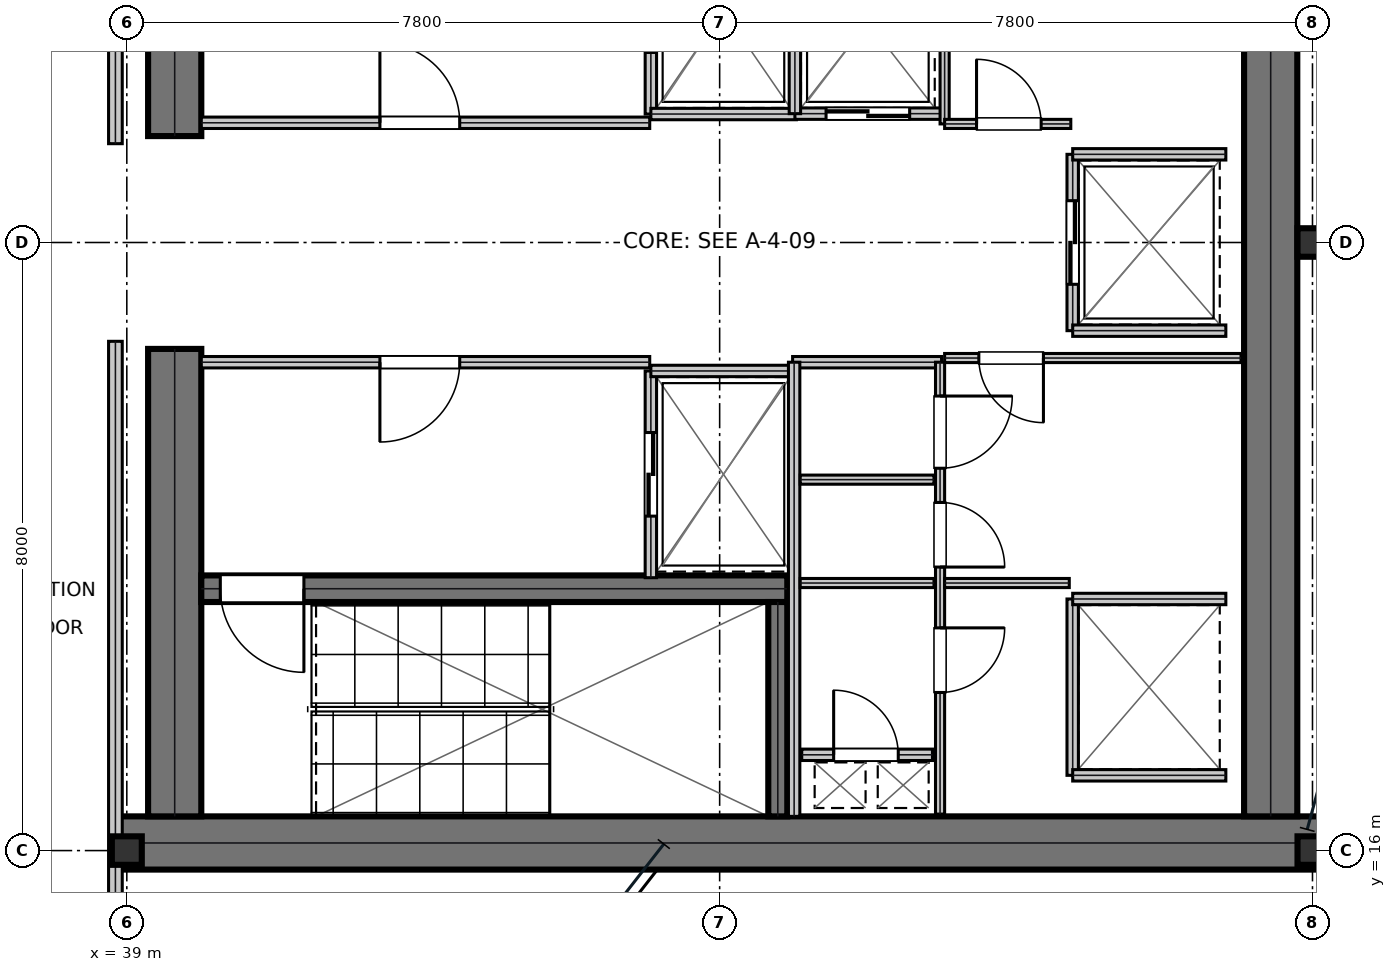
"""IFC4 building model, lengths in metres.
Left out: names, types, materials, properties, quantities, classifications, styles, units other than length and angle.
Written with IfcOpenShell. Run it as: python <this file> out.ifc"""

import sys

from ifc_helpers import new_model, si_unit, direction, frame, frame_2d, origin, origin_2d, place, context, subcontext, project, spatial, rectangle, i_section, extrude, element, fill, save


model = new_model("IFC4")
c1 = context("Model", 3, precision=1e-05, world=origin(), true_north=direction((0.0, 1.0)))
c2 = subcontext(c1, "Body", "Model", "MODEL_VIEW")
j1 = project(units=[si_unit("LENGTHUNIT", "METRE"), si_unit("PLANEANGLEUNIT", "RADIAN")], contexts=[c1])
p1 = place(None, origin())
s1 = spatial("IfcSite", under=j1, at=p1, CompositionType="ELEMENT")
p2 = place(p1, origin())
s2 = spatial("IfcBuilding", under=s1, at=p2, CompositionType="ELEMENT")
p3 = place(p2, frame((0.0, 0.0, 244.5)))
s3 = spatial("IfcBuildingStorey", under=s2, at=p3, CompositionType="ELEMENT", Elevation=244.5)
p4 = place(p3, frame((38.8, 16.1, 0.0), z_axis=(0.0, 0.0, 1.0), x_axis=(1.0, 0.0, 0.0)))
e1 = element("IfcWall", 1, at=p4, inside=s3, PredefinedType="SHEAR", context=c2, shape_type="SweptSolid", body=[
    extrude(rectangle(XDim=16.0, YDim=0.7, at=frame_2d((8.0, 0.0))), origin(), (0.0, 0.0, 1.0), 3.79),
])
for number, where, z_axis, x_axis in (
    (2, (39.63, 16.45, 0.0), (0.0, 0.0, 1.0), (0.0, 1.0, 0.0)),
    (3, (39.63, 25.4, 0.0), (0.0, 0.0, 1.0), (0.0, 1.0, 0.0)),
):
    element("IfcWall", number, at=place(p3, frame(where, z_axis=z_axis, x_axis=x_axis)), inside=s3, PredefinedType="SHEAR", context=c2, shape_type="SweptSolid", body=[
        extrude(rectangle(XDim=6.15, YDim=0.7, at=frame_2d((3.075, 0.0))), origin(), (0.0, 0.0, 1.0), 3.79),
    ])
p5 = place(p3, frame((54.05, 16.45, 0.0), z_axis=(0.0, 0.0, 1.0), x_axis=(0.0, 1.0, 0.0)))
e4 = element("IfcWall", 4, at=p5, inside=s3, PredefinedType="SHEAR", context=c2, shape_type="SweptSolid", body=[
    extrude(rectangle(XDim=15.1, YDim=0.7, at=frame_2d((7.55, 0.0))), origin(), (0.0, 0.0, 1.0), 3.79),
])
p6 = place(p3, frame((39.98, 19.445, 0.0), z_axis=(0.0, 0.0, 1.0), x_axis=(1.0, 0.0, 0.0)))
e5 = element("IfcWall", 5, at=p6, inside=s3, PredefinedType="SHEAR", context=c2, shape_type="SweptSolid", body=[
    extrude(rectangle(XDim=7.71, YDim=0.35, at=frame_2d((3.855, 0.0))), origin(), (0.0, 0.0, 1.0), 3.79),
])
p7 = place(p6, frame((0.25, 0.0, 0.0)))
e6 = element("IfcOpeningElement", 6, at=p7, cuts=e5, PredefinedType="OPENING", context=c2, shape_type="SweptSolid", body=[
    extrude(rectangle(XDim=1.1, YDim=2.15, at=frame_2d((0.55, 1.075))), frame((0.0, 0.185, 0.0), z_axis=(0.0, -1.0, 0.0), x_axis=(1.0, 0.0, 0.0)), (0.0, 0.0, 1.0), 0.37),
])
p8 = place(p3, frame((47.565, 16.45, 0.0), z_axis=(0.0, 0.0, 1.0), x_axis=(0.0, 1.0, 0.0)))
e7 = element("IfcWall", 7, at=p8, inside=s3, PredefinedType="SHEAR", context=c2, shape_type="SweptSolid", body=[
    extrude(rectangle(XDim=2.82, YDim=0.25, at=frame_2d((1.41, 0.0))), origin(), (0.0, 0.0, 1.0), 3.79),
])
for number, where, z_axis, x_axis in (
    (8, (39.0, 16.0, 0.0), (0.0, 0.0, 1.0), (1.0, 0.0, 0.0)),
    (9, (54.6, 16.0, 0.0), (0.0, 0.0, 1.0), (1.0, 0.0, 0.0)),
    (10, (54.6, 24.0, 0.0), (0.0, 0.0, 1.0), (1.0, 0.0, 0.0)),
):
    element("IfcColumn", number, at=place(p3, frame(where, z_axis=z_axis, x_axis=x_axis)), inside=s3, PredefinedType="COLUMN", context=c2, shape_type="SweptSolid", body=[
        extrude(i_section(OverallWidth=0.394, OverallDepth=0.375, WebThickness=0.017, FlangeThickness=0.028, at=origin_2d()), origin(), (0.0, 0.0, 1.0), 4.044),
    ])
p9 = place(p3, frame((39.98, 25.575, 0.0), z_axis=(0.0, 0.0, 1.0), x_axis=(1.0, 0.0, 0.0)))
e11 = element("IfcWall", 11, at=p9, inside=s3, PredefinedType="PARTITIONING", context=c2, shape_type="SweptSolid", body=[
    extrude(rectangle(XDim=5.9, YDim=0.15, at=frame_2d((2.95, 0.0))), origin(), (0.0, 0.0, 1.0), 3.79),
])
p10 = place(p9, frame((2.35, 0.0, 0.0)))
e12 = element("IfcOpeningElement", 12, at=p10, cuts=e11, PredefinedType="OPENING", context=c2, shape_type="SweptSolid", body=[
    extrude(rectangle(XDim=1.05, YDim=2.15, at=frame_2d((0.525, 1.075))), frame((0.0, 0.085, 0.0), z_axis=(0.0, -1.0, 0.0), x_axis=(1.0, 0.0, 0.0)), (0.0, 0.0, 1.0), 0.17),
])
p11 = place(p3, frame((39.98, 22.425, 0.0), z_axis=(0.0, 0.0, 1.0), x_axis=(1.0, 0.0, 0.0)))
e13 = element("IfcWall", 13, at=p11, inside=s3, PredefinedType="PARTITIONING", context=c2, shape_type="SweptSolid", body=[
    extrude(rectangle(XDim=5.9, YDim=0.15, at=frame_2d((2.95, 0.0))), origin(), (0.0, 0.0, 1.0), 3.79),
])
p12 = place(p11, frame((2.35, 0.0, 0.0)))
e14 = element("IfcOpeningElement", 14, at=p12, cuts=e13, PredefinedType="OPENING", context=c2, shape_type="SweptSolid", body=[
    extrude(rectangle(XDim=1.05, YDim=2.15, at=frame_2d((0.525, 1.075))), frame((0.0, 0.085, 0.0), z_axis=(0.0, -1.0, 0.0), x_axis=(1.0, 0.0, 0.0)), (0.0, 0.0, 1.0), 0.17),
])
p13 = place(p3, frame((45.895, 25.69, 0.0), z_axis=(0.0, 0.0, 1.0), x_axis=(0.0, 1.0, 0.0)))
e15 = element("IfcWall", 15, at=p13, inside=s3, PredefinedType="PARTITIONING", context=c2, shape_type="SweptSolid", body=[
    extrude(rectangle(XDim=2.72, YDim=0.15, at=frame_2d((1.36, 0.0))), origin(), (0.0, 0.0, 1.0), 3.79),
])
p14 = place(p13, frame((0.81, 0.0, 0.0)))
e16 = element("IfcOpeningElement", 16, at=p14, cuts=e15, PredefinedType="OPENING", context=c2, shape_type="SweptSolid", body=[
    extrude(rectangle(XDim=1.1, YDim=2.15, at=frame_2d((0.55, 1.075))), frame((0.0, 0.085, 0.0), z_axis=(0.0, -1.0, 0.0), x_axis=(1.0, 0.0, 0.0)), (0.0, 0.0, 1.0), 0.17),
])
p15 = place(p3, frame((45.895, 25.69, 0.0), z_axis=(0.0, 0.0, 1.0), x_axis=(1.0, 0.0, 0.0)))
e17 = element("IfcWall", 17, at=p15, inside=s3, PredefinedType="PARTITIONING", context=c2, shape_type="SweptSolid", body=[
    extrude(rectangle(XDim=1.915, YDim=0.15, at=frame_2d((0.958, 0.0))), origin(), (0.0, 0.0, 1.0), 3.79),
])
p16 = place(p3, frame((45.895, 19.59, 0.0), z_axis=(0.0, 0.0, 1.0), x_axis=(0.0, 1.0, 0.0)))
e18 = element("IfcWall", 18, at=p16, inside=s3, PredefinedType="PARTITIONING", context=c2, shape_type="SweptSolid", body=[
    extrude(rectangle(XDim=2.72, YDim=0.15, at=frame_2d((1.36, 0.0))), origin(), (0.0, 0.0, 1.0), 3.79),
])
p17 = place(p16, frame((0.81, 0.0, 0.0)))
e19 = element("IfcOpeningElement", 19, at=p17, cuts=e18, PredefinedType="OPENING", context=c2, shape_type="SweptSolid", body=[
    extrude(rectangle(XDim=1.1, YDim=2.15, at=frame_2d((0.55, 1.075))), frame((0.0, 0.085, 0.0), z_axis=(0.0, -1.0, 0.0), x_axis=(1.0, 0.0, 0.0)), (0.0, 0.0, 1.0), 0.17),
])
p18 = place(p3, frame((45.895, 22.31, 0.0), z_axis=(0.0, 0.0, 1.0), x_axis=(1.0, 0.0, 0.0)))
e20 = element("IfcWall", 20, at=p18, inside=s3, PredefinedType="PARTITIONING", context=c2, shape_type="SweptSolid", body=[
    extrude(rectangle(XDim=1.915, YDim=0.15, at=frame_2d((0.958, 0.0))), origin(), (0.0, 0.0, 1.0), 3.79),
])
p19 = place(p3, frame((47.79, 25.695, 0.0), z_axis=(0.0, 0.0, 1.0), x_axis=(1.0, 0.0, 0.0)))
e21 = element("IfcWall", 21, at=p19, inside=s3, PredefinedType="PARTITIONING", context=c2, shape_type="SweptSolid", body=[
    extrude(rectangle(XDim=1.92, YDim=0.15, at=frame_2d((0.96, 0.0))), origin(), (0.0, 0.0, 1.0), 3.79),
])
p20 = place(p19, frame((0.41, 0.0, 0.0)))
e22 = element("IfcOpeningElement", 22, at=p20, cuts=e21, PredefinedType="OPENING", context=c2, shape_type="SweptSolid", body=[
    extrude(rectangle(XDim=1.1, YDim=2.15, at=frame_2d((0.55, 1.075))), frame((0.0, 0.085, 0.0), z_axis=(0.0, -1.0, 0.0), x_axis=(1.0, 0.0, 0.0)), (0.0, 0.0, 1.0), 0.17),
])
p21 = place(p3, frame((47.79, 25.695, 0.0), z_axis=(0.0, 0.0, 1.0), x_axis=(0.0, 1.0, 0.0)))
e23 = element("IfcWall", 23, at=p21, inside=s3, PredefinedType="PARTITIONING", context=c2, shape_type="SweptSolid", body=[
    extrude(rectangle(XDim=2.415, YDim=0.15, at=frame_2d((1.208, 0.0))), origin(), (0.0, 0.0, 1.0), 3.79),
])
p22 = place(p3, frame((51.445, 22.84, 0.0), z_axis=(0.0, 0.0, 1.0), x_axis=(0.0, 1.0, 0.0)))
e24 = element("IfcWall", 24, at=p22, inside=s3, PredefinedType="PARTITIONING", context=c2, shape_type="SweptSolid", body=[
    extrude(rectangle(XDim=2.32, YDim=0.15, at=frame_2d((1.16, 0.0))), origin(), (0.0, 0.0, 1.0), 3.79),
])
p23 = place(p22, frame((0.61, 0.0, 0.0)))
e25 = element("IfcOpeningElement", 25, at=p23, cuts=e24, PredefinedType="OPENING", context=c2, shape_type="SweptSolid", body=[
    extrude(rectangle(XDim=1.1, YDim=2.15, at=frame_2d((0.55, 1.075))), frame((0.0, 0.085, 0.0), z_axis=(0.0, -1.0, 0.0), x_axis=(1.0, 0.0, 0.0)), (0.0, 0.0, 1.0), 0.17),
])
for number, where, z_axis, x_axis in (
    (26, (51.445, 22.84, 0.0), (0.0, 0.0, 1.0), (1.0, 0.0, 0.0)),
    (27, (51.445, 25.16, 0.0), (0.0, 0.0, 1.0), (1.0, 0.0, 0.0)),
):
    element("IfcWall", number, at=place(p3, frame(where, z_axis=z_axis, x_axis=x_axis)), inside=s3, PredefinedType="PARTITIONING", context=c2, shape_type="SweptSolid", body=[
        extrude(rectangle(XDim=2.015, YDim=0.15, at=frame_2d((1.007, 0.0))), origin(), (0.0, 0.0, 1.0), 3.79),
    ])
p24 = place(p3, frame((51.445, 16.99, 0.0), z_axis=(0.0, 0.0, 1.0), x_axis=(0.0, 1.0, 0.0)))
e28 = element("IfcWall", 28, at=p24, inside=s3, PredefinedType="PARTITIONING", context=c2, shape_type="SweptSolid", body=[
    extrude(rectangle(XDim=2.32, YDim=0.15, at=frame_2d((1.16, 0.0))), origin(), (0.0, 0.0, 1.0), 3.79),
])
for number, where, z_axis, x_axis in (
    (29, (51.445, 16.99, 0.0), (0.0, 0.0, 1.0), (1.0, 0.0, 0.0)),
    (30, (51.445, 19.31, 0.0), (0.0, 0.0, 1.0), (1.0, 0.0, 0.0)),
):
    element("IfcWall", number, at=place(p3, frame(where, z_axis=z_axis, x_axis=x_axis)), inside=s3, PredefinedType="PARTITIONING", context=c2, shape_type="SweptSolid", body=[
        extrude(rectangle(XDim=2.015, YDim=0.15, at=frame_2d((1.007, 0.0))), origin(), (0.0, 0.0, 1.0), 3.79),
    ])
p25 = place(p3, frame((47.88, 17.26, 0.0), z_axis=(0.0, 0.0, 1.0), x_axis=(1.0, 0.0, 0.0)))
e31 = element("IfcWall", 31, at=p25, inside=s3, PredefinedType="PARTITIONING", context=c2, shape_type="SweptSolid", body=[
    extrude(rectangle(XDim=1.72, YDim=0.15, at=frame_2d((0.86, 0.0))), origin(), (0.0, 0.0, 1.0), 3.79),
])
p26 = place(p25, frame((0.42, 0.0, 0.0)))
e32 = element("IfcOpeningElement", 32, at=p26, cuts=e31, PredefinedType="OPENING", context=c2, shape_type="SweptSolid", body=[
    extrude(rectangle(XDim=0.85, YDim=2.15, at=frame_2d((0.425, 1.075))), frame((0.0, 0.085, 0.0), z_axis=(0.0, -1.0, 0.0), x_axis=(1.0, 0.0, 0.0)), (0.0, 0.0, 1.0), 0.17),
])
p27 = place(p3, frame((47.76, 22.425, 0.0), z_axis=(0.0, 0.0, 1.0), x_axis=(1.0, 0.0, 0.0)))
e33 = element("IfcWall", 33, at=p27, inside=s3, PredefinedType="PARTITIONING", context=c2, shape_type="SweptSolid", body=[
    extrude(rectangle(XDim=1.96, YDim=0.15, at=frame_2d((0.98, 0.0))), origin(), (0.0, 0.0, 1.0), 3.79),
])
p28 = place(p3, frame((47.78, 16.45, 0.0), z_axis=(0.0, 0.0, 1.0), x_axis=(0.0, 1.0, 0.0)))
e34 = element("IfcWall", 34, at=p28, inside=s3, PredefinedType="PARTITIONING", context=c2, shape_type="SweptSolid", body=[
    extrude(rectangle(XDim=5.975, YDim=0.15, at=frame_2d((2.988, 0.0))), origin(), (0.0, 0.0, 1.0), 3.79),
])
for number, where, z_axis, x_axis in (
    (35, (47.86, 19.52, 0.0), (0.0, 0.0, 1.0), (1.0, 0.0, 0.0)),
    (36, (47.86, 20.88, 0.0), (0.0, 0.0, 1.0), (1.0, 0.0, 0.0)),
):
    element("IfcWall", number, at=place(p3, frame(where, z_axis=z_axis, x_axis=x_axis)), inside=s3, PredefinedType="PARTITIONING", context=c2, shape_type="SweptSolid", body=[
        extrude(rectangle(XDim=1.76, YDim=0.12, at=frame_2d((0.88, 0.0))), origin(), (0.0, 0.0, 1.0), 3.79),
    ])
p29 = place(p3, frame((49.7, 16.48, 0.0), z_axis=(0.0, 0.0, 1.0), x_axis=(0.0, 1.0, 0.0)))
e37 = element("IfcWall", 37, at=p29, inside=s3, PredefinedType="PARTITIONING", context=c2, shape_type="SweptSolid", body=[
    extrude(rectangle(XDim=5.945, YDim=0.12, at=frame_2d((2.973, 0.0))), origin(), (0.0, 0.0, 1.0), 3.79),
])
p30 = place(p29, frame((1.6, 0.0, 0.0)))
e38 = element("IfcOpeningElement", 38, at=p30, cuts=e37, PredefinedType="OPENING", context=c2, shape_type="SweptSolid", body=[
    extrude(rectangle(XDim=0.85, YDim=2.15, at=frame_2d((0.425, 1.075))), frame((0.0, 0.07, 0.0), z_axis=(0.0, -1.0, 0.0), x_axis=(1.0, 0.0, 0.0)), (0.0, 0.0, 1.0), 0.14),
])
p31 = place(p29, frame((3.25, 0.0, 0.0)))
e39 = element("IfcOpeningElement", 39, at=p31, cuts=e37, PredefinedType="OPENING", context=c2, shape_type="SweptSolid", body=[
    extrude(rectangle(XDim=0.85, YDim=2.15, at=frame_2d((0.425, 1.075))), frame((0.0, 0.07, 0.0), z_axis=(0.0, -1.0, 0.0), x_axis=(1.0, 0.0, 0.0)), (0.0, 0.0, 1.0), 0.14),
])
p32 = place(p29, frame((4.55, 0.0, 0.0)))
e40 = element("IfcOpeningElement", 40, at=p32, cuts=e37, PredefinedType="OPENING", context=c2, shape_type="SweptSolid", body=[
    extrude(rectangle(XDim=0.95, YDim=2.15, at=frame_2d((0.475, 1.075))), frame((0.0, 0.07, 0.0), z_axis=(0.0, -1.0, 0.0), x_axis=(1.0, 0.0, 0.0)), (0.0, 0.0, 1.0), 0.14),
])
p33 = place(p3, frame((49.76, 22.48, 0.0), z_axis=(0.0, 0.0, 1.0), x_axis=(1.0, 0.0, 0.0)))
e41 = element("IfcWall", 41, at=p33, inside=s3, PredefinedType="PARTITIONING", context=c2, shape_type="SweptSolid", body=[
    extrude(rectangle(XDim=3.9, YDim=0.12, at=frame_2d((1.95, 0.0))), origin(), (0.0, 0.0, 1.0), 3.79),
])
p34 = place(p33, frame((0.45, 0.0, 0.0)))
e42 = element("IfcOpeningElement", 42, at=p34, cuts=e41, PredefinedType="OPENING", context=c2, shape_type="SweptSolid", body=[
    extrude(rectangle(XDim=0.85, YDim=2.15, at=frame_2d((0.425, 1.075))), frame((0.0, 0.07, 0.0), z_axis=(0.0, -1.0, 0.0), x_axis=(1.0, 0.0, 0.0)), (0.0, 0.0, 1.0), 0.14),
])
p35 = place(p3, frame((49.76, 19.52, 0.0), z_axis=(0.0, 0.0, 1.0), x_axis=(1.0, 0.0, 0.0)))
e43 = element("IfcWall", 43, at=p35, inside=s3, PredefinedType="PARTITIONING", context=c2, shape_type="SweptSolid", body=[
    extrude(rectangle(XDim=1.64, YDim=0.12, at=frame_2d((0.82, 0.0))), origin(), (0.0, 0.0, 1.0), 3.79),
])
p36 = place(p3, frame((49.76, 25.56, 0.0), z_axis=(0.0, 0.0, 1.0), x_axis=(0.0, 1.0, 0.0)))
e44 = element("IfcWall", 44, at=p36, inside=s3, PredefinedType="PARTITIONING", context=c2, shape_type="SweptSolid", body=[
    extrude(rectangle(XDim=2.66, YDim=0.12, at=frame_2d((1.33, 0.0))), origin(), (0.0, 0.0, 1.0), 3.79),
])
p37 = place(p3, frame((49.76, 25.56, 0.0), z_axis=(0.0, 0.0, 1.0), x_axis=(1.0, 0.0, 0.0)))
e45 = element("IfcWall", 45, at=p37, inside=s3, PredefinedType="PARTITIONING", context=c2, shape_type="SweptSolid", body=[
    extrude(rectangle(XDim=1.66, YDim=0.12, at=frame_2d((0.83, 0.0))), origin(), (0.0, 0.0, 1.0), 3.79),
])
p38 = place(p37, frame((0.42, 0.0, 0.0)))
e46 = element("IfcOpeningElement", 46, at=p38, cuts=e45, PredefinedType="OPENING", context=c2, shape_type="SweptSolid", body=[
    extrude(rectangle(XDim=0.85, YDim=2.15, at=frame_2d((0.425, 1.075))), frame((0.0, 0.07, 0.0), z_axis=(0.0, -1.0, 0.0), x_axis=(1.0, 0.0, 0.0)), (0.0, 0.0, 1.0), 0.14),
])
for number, where, z_axis, x_axis in (
    (47, (38.85, 14.5, 0.0), (0.0, 0.0, 1.0), (0.0, 1.0, 0.0)),
    (48, (38.85, 25.3, 0.0), (0.0, 0.0, 1.0), (0.0, 1.0, 0.0)),
):
    element("IfcWall", number, at=place(p3, frame(where, z_axis=z_axis, x_axis=x_axis)), inside=s3, PredefinedType="SOLIDWALL", context=c2, shape_type="SweptSolid", body=[
        extrude(rectangle(XDim=8.2, YDim=0.18, at=frame_2d((4.1, 0.0))), origin(), (0.0, 0.0, 1.0), 3.241),
    ])
p39 = place(p10, origin())
e49 = element("IfcDoor", 49, at=p39, inside=s3, OperationType="SINGLE_SWING_LEFT", PredefinedType="DOOR", context=c2, shape_type="SweptSolid", body=[
    extrude(rectangle(XDim=1.05, YDim=2.15, at=frame_2d((0.525, 1.075))), frame((0.0, 0.025, 0.0), z_axis=(0.0, -1.0, 0.0), x_axis=(1.0, 0.0, 0.0)), (0.0, 0.0, 1.0), 0.05),
])
fill(e12, e49)
p40 = place(p12, frame((1.05, 0.0, 0.0), z_axis=(0.0, 0.0, 1.0), x_axis=(-1.0, 0.0, 0.0)))
e50 = element("IfcDoor", 50, at=p40, inside=s3, OperationType="SINGLE_SWING_RIGHT", PredefinedType="DOOR", context=c2, shape_type="SweptSolid", body=[
    extrude(rectangle(XDim=1.05, YDim=2.15, at=frame_2d((0.525, 1.075))), frame((0.0, 0.025, 0.0), z_axis=(0.0, -1.0, 0.0), x_axis=(1.0, 0.0, 0.0)), (0.0, 0.0, 1.0), 0.05),
])
fill(e14, e50)
p41 = place(p17, frame((1.1, 0.0, 0.0), z_axis=(0.0, 0.0, 1.0), x_axis=(-1.0, 0.0, 0.0)))
e51 = element("IfcDoor", 51, at=p41, inside=s3, OperationType="DOUBLE_DOOR_SLIDING", PredefinedType="DOOR", context=c2, shape_type="SweptSolid", body=[
    extrude(rectangle(XDim=1.1, YDim=2.15, at=frame_2d((0.55, 1.075))), frame((0.0, 0.025, 0.0), z_axis=(0.0, -1.0, 0.0), x_axis=(1.0, 0.0, 0.0)), (0.0, 0.0, 1.0), 0.05),
])
fill(e19, e51)
p42 = place(p20, frame((1.1, 0.0, 0.0), z_axis=(0.0, 0.0, 1.0), x_axis=(-1.0, 0.0, 0.0)))
e52 = element("IfcDoor", 52, at=p42, inside=s3, OperationType="DOUBLE_DOOR_SLIDING", PredefinedType="DOOR", context=c2, shape_type="SweptSolid", body=[
    extrude(rectangle(XDim=1.1, YDim=2.15, at=frame_2d((0.55, 1.075))), frame((0.0, 0.025, 0.0), z_axis=(0.0, -1.0, 0.0), x_axis=(1.0, 0.0, 0.0)), (0.0, 0.0, 1.0), 0.05),
])
fill(e22, e52)
p43 = place(p23, frame((1.1, 0.0, 0.0), z_axis=(0.0, 0.0, 1.0), x_axis=(-1.0, 0.0, 0.0)))
e53 = element("IfcDoor", 53, at=p43, inside=s3, OperationType="DOUBLE_DOOR_SLIDING", PredefinedType="DOOR", context=c2, shape_type="SweptSolid", body=[
    extrude(rectangle(XDim=1.1, YDim=2.15, at=frame_2d((0.55, 1.075))), frame((0.0, 0.025, 0.0), z_axis=(0.0, -1.0, 0.0), x_axis=(1.0, 0.0, 0.0)), (0.0, 0.0, 1.0), 0.05),
])
fill(e25, e53)
p44 = place(p26, origin())
e54 = element("IfcDoor", 54, at=p44, inside=s3, OperationType="SINGLE_SWING_LEFT", PredefinedType="TRAPDOOR", context=c2, shape_type="SweptSolid", body=[
    extrude(rectangle(XDim=0.85, YDim=2.15, at=frame_2d((0.425, 1.075))), frame((0.0, 0.025, 0.0), z_axis=(0.0, -1.0, 0.0), x_axis=(1.0, 0.0, 0.0)), (0.0, 0.0, 1.0), 0.05),
])
fill(e32, e54)
p45 = place(p30, frame((0.85, 0.0, 0.0), z_axis=(0.0, 0.0, 1.0), x_axis=(-1.0, 0.0, 0.0)))
e55 = element("IfcDoor", 55, at=p45, inside=s3, OperationType="SINGLE_SWING_LEFT", PredefinedType="DOOR", context=c2, shape_type="SweptSolid", body=[
    extrude(rectangle(XDim=0.85, YDim=2.15, at=frame_2d((0.425, 1.075))), frame((0.0, 0.025, 0.0), z_axis=(0.0, -1.0, 0.0), x_axis=(1.0, 0.0, 0.0)), (0.0, 0.0, 1.0), 0.05),
])
fill(e38, e55)
p46 = place(p31, frame((0.85, 0.0, 0.0), z_axis=(0.0, 0.0, 1.0), x_axis=(-1.0, 0.0, 0.0)))
e56 = element("IfcDoor", 56, at=p46, inside=s3, OperationType="SINGLE_SWING_RIGHT", PredefinedType="DOOR", context=c2, shape_type="SweptSolid", body=[
    extrude(rectangle(XDim=0.85, YDim=2.15, at=frame_2d((0.425, 1.075))), frame((0.0, 0.025, 0.0), z_axis=(0.0, -1.0, 0.0), x_axis=(1.0, 0.0, 0.0)), (0.0, 0.0, 1.0), 0.05),
])
fill(e39, e56)
p47 = place(p32, frame((0.95, 0.0, 0.0), z_axis=(0.0, 0.0, 1.0), x_axis=(-1.0, 0.0, 0.0)))
e57 = element("IfcDoor", 57, at=p47, inside=s3, OperationType="SINGLE_SWING_LEFT", PredefinedType="DOOR", context=c2, shape_type="SweptSolid", body=[
    extrude(rectangle(XDim=0.95, YDim=2.15, at=frame_2d((0.475, 1.075))), frame((0.0, 0.025, 0.0), z_axis=(0.0, -1.0, 0.0), x_axis=(1.0, 0.0, 0.0)), (0.0, 0.0, 1.0), 0.05),
])
fill(e40, e57)
p48 = place(p34, frame((0.85, 0.0, 0.0), z_axis=(0.0, 0.0, 1.0), x_axis=(-1.0, 0.0, 0.0)))
e58 = element("IfcDoor", 58, at=p48, inside=s3, OperationType="SINGLE_SWING_LEFT", PredefinedType="DOOR", context=c2, shape_type="SweptSolid", body=[
    extrude(rectangle(XDim=0.85, YDim=2.15, at=frame_2d((0.425, 1.075))), frame((0.0, 0.025, 0.0), z_axis=(0.0, -1.0, 0.0), x_axis=(1.0, 0.0, 0.0)), (0.0, 0.0, 1.0), 0.05),
])
fill(e42, e58)
p49 = place(p38, origin())
e59 = element("IfcDoor", 59, at=p49, inside=s3, OperationType="SINGLE_SWING_LEFT", PredefinedType="DOOR", context=c2, shape_type="SweptSolid", body=[
    extrude(rectangle(XDim=0.85, YDim=2.15, at=frame_2d((0.425, 1.075))), frame((0.0, 0.025, 0.0), z_axis=(0.0, -1.0, 0.0), x_axis=(1.0, 0.0, 0.0)), (0.0, 0.0, 1.0), 0.05),
])
fill(e46, e59)
p50 = place(p7, frame((1.1, 0.0, 0.0), z_axis=(0.0, 0.0, 1.0), x_axis=(-1.0, 0.0, 0.0)))
e60 = element("IfcDoor", 60, at=p50, inside=s3, OperationType="SINGLE_SWING_LEFT", PredefinedType="DOOR", context=c2, shape_type="SweptSolid", body=[
    extrude(rectangle(XDim=1.1, YDim=2.15, at=frame_2d((0.55, 1.075))), frame((0.0, 0.025, 0.0), z_axis=(0.0, -1.0, 0.0), x_axis=(1.0, 0.0, 0.0)), (0.0, 0.0, 1.0), 0.05),
])
fill(e6, e60)
save(model, sys.argv[1])
